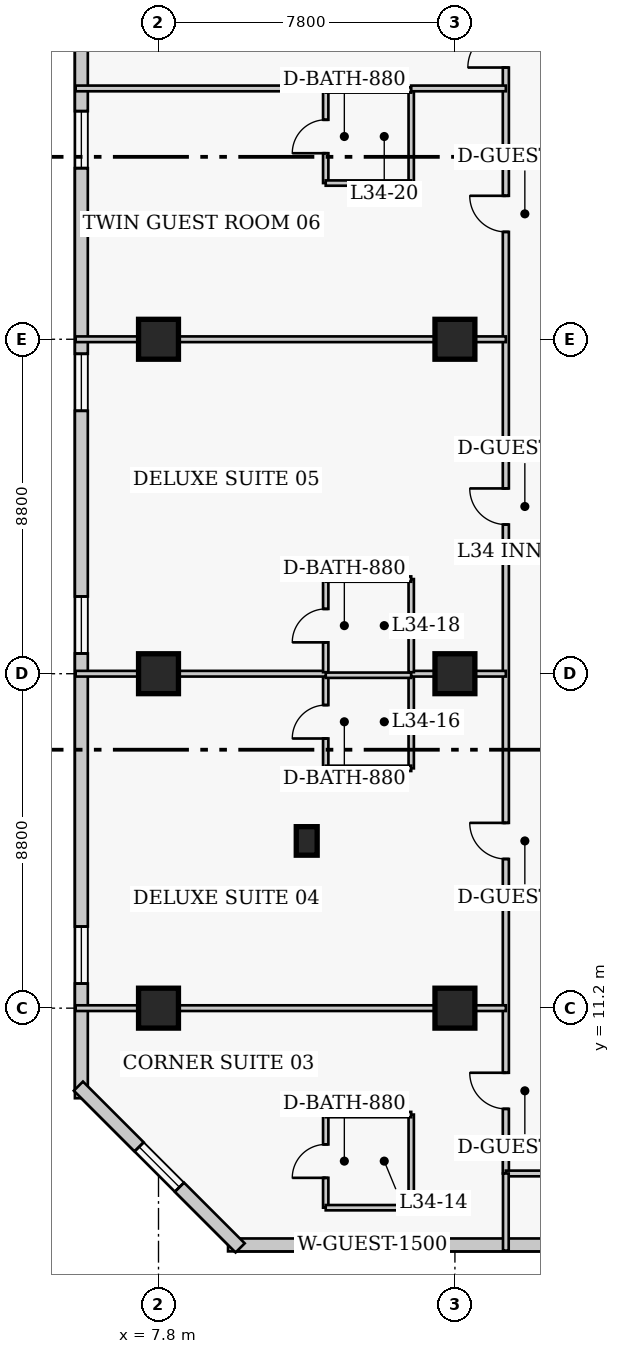
"""IFC4 building model, lengths in metres.
Left out: names, types, materials, properties, quantities, classifications, styles, units other than length and angle.
Written with IfcOpenShell. Run it as: python <this file> out.ifc"""

import sys

from ifc_helpers import new_model, si_unit, direction, frame, frame_2d, origin, origin_2d, place, context, subcontext, project, spatial, rectangle, extrude, element, fill, save


model = new_model("IFC4")
c1 = context("Model", 3, precision=1e-05, world=origin(), true_north=direction((0.0, 1.0)))
c2 = subcontext(c1, "Body", "Model", "MODEL_VIEW")
j1 = project(units=[si_unit("LENGTHUNIT", "METRE"), si_unit("PLANEANGLEUNIT", "RADIAN")], contexts=[c1])
p1 = place(None, origin())
s1 = spatial("IfcSite", under=j1, at=p1, CompositionType="ELEMENT")
p2 = place(p1, origin())
s2 = spatial("IfcBuilding", under=s1, at=p2, CompositionType="ELEMENT")
p3 = place(p2, frame((0.0, 0.0, 138.4)))
s3 = spatial("IfcBuildingStorey", under=s2, at=p3, CompositionType="ELEMENT", Elevation=138.4)
for number, where, z_axis, x_axis in (
    (1, (7.8, 11.2, 0.0), (0.0, 0.0, 1.0), (1.0, 0.0, 0.0)),
    (2, (7.8, 20.0, 0.0), (0.0, 0.0, 1.0), (1.0, 0.0, 0.0)),
    (3, (7.8, 28.8, 0.0), (0.0, 0.0, 1.0), (1.0, 0.0, 0.0)),
    (4, (15.6, 11.2, 0.0), (0.0, 0.0, 1.0), (1.0, 0.0, 0.0)),
    (5, (15.6, 20.0, 0.0), (0.0, 0.0, 1.0), (1.0, 0.0, 0.0)),
    (6, (15.6, 28.8, 0.0), (0.0, 0.0, 1.0), (1.0, 0.0, 0.0)),
):
    element("IfcColumn", number, at=place(p3, frame(where, z_axis=z_axis, x_axis=x_axis)), inside=s3, PredefinedType="COLUMN", context=c2, shape_type="SweptSolid", body=[
        extrude(rectangle(XDim=1.05, YDim=1.05, at=origin_2d()), origin(), (0.0, 0.0, 1.0), 3.8),
    ])
p4 = place(p3, frame((11.7, 15.6, 0.0), z_axis=(0.0, 0.0, 1.0), x_axis=(1.0, 0.0, 0.0)))
e7 = element("IfcColumn", 7, at=p4, inside=s3, PredefinedType="PILASTER", context=c2, shape_type="SweptSolid", body=[
    extrude(rectangle(XDim=0.55, YDim=0.75, at=origin_2d()), origin(), (0.0, 0.0, 1.0), 3.8),
])
p5 = place(p3, frame((9.63, 4.97, 0.0), z_axis=(0.0, 0.0, 1.0), x_axis=(1.0, 0.0, 0.0)))
e8 = element("IfcWall", 8, at=p5, inside=s3, PredefinedType="SOLIDWALL", context=c2, shape_type="SweptSolid", body=[
    extrude(rectangle(XDim=26.69, YDim=0.34, at=frame_2d((13.345, 0.0))), origin(), (0.0, 0.0, 1.0), 3.55),
])
p6 = place(p5, frame((16.97, 0.0, 0.0)))
e9 = element("IfcOpeningElement", 9, at=p6, cuts=e8, PredefinedType="OPENING", context=c2, shape_type="SweptSolid", body=[
    extrude(rectangle(XDim=1.4, YDim=2.15, at=frame_2d((0.7, 1.075))), frame((0.0, 0.18, 0.0), z_axis=(0.0, -1.0, 0.0), x_axis=(1.0, 0.0, 0.0)), (0.0, 0.0, 1.0), 0.36),
])
p7 = place(p5, frame((3.048, 0.0, 0.85)))
e10 = element("IfcOpeningElement", 10, at=p7, cuts=e8, PredefinedType="OPENING", context=c2, shape_type="SweptSolid", body=[
    extrude(rectangle(XDim=1.5, YDim=1.75, at=frame_2d((0.75, 0.875))), frame((0.0, 0.18, 0.0), z_axis=(0.0, -1.0, 0.0), x_axis=(1.0, 0.0, 0.0)), (0.0, 0.0, 1.0), 0.36),
])
p8 = place(p5, frame((22.642, 0.0, 0.85)))
e11 = element("IfcOpeningElement", 11, at=p8, cuts=e8, PredefinedType="OPENING", context=c2, shape_type="SweptSolid", body=[
    extrude(rectangle(XDim=1.5, YDim=1.75, at=frame_2d((0.75, 0.875))), frame((0.0, 0.18, 0.0), z_axis=(0.0, -1.0, 0.0), x_axis=(1.0, 0.0, 0.0)), (0.0, 0.0, 1.0), 0.36),
])
p9 = place(p3, frame((5.77, 38.97, 0.0), z_axis=(0.0, 0.0, 1.0), x_axis=(0.0, -1.0, 0.0)))
e12 = element("IfcWall", 12, at=p9, inside=s3, PredefinedType="SOLIDWALL", context=c2, shape_type="SweptSolid", body=[
    extrude(rectangle(XDim=30.14, YDim=0.34, at=frame_2d((15.07, 0.0))), origin(), (0.0, 0.0, 1.0), 3.55),
])
p10 = place(p9, frame((4.167, 0.0, 0.85)))
e13 = element("IfcOpeningElement", 13, at=p10, cuts=e12, PredefinedType="OPENING", context=c2, shape_type="SweptSolid", body=[
    extrude(rectangle(XDim=1.5, YDim=1.75, at=frame_2d((0.75, 0.875))), frame((0.0, 0.18, 0.0), z_axis=(0.0, -1.0, 0.0), x_axis=(1.0, 0.0, 0.0)), (0.0, 0.0, 1.0), 0.36),
])
p11 = place(p9, frame((10.552, 0.0, 0.85)))
e14 = element("IfcOpeningElement", 14, at=p11, cuts=e12, PredefinedType="OPENING", context=c2, shape_type="SweptSolid", body=[
    extrude(rectangle(XDim=1.5, YDim=1.75, at=frame_2d((0.75, 0.875))), frame((0.0, 0.18, 0.0), z_axis=(0.0, -1.0, 0.0), x_axis=(1.0, 0.0, 0.0)), (0.0, 0.0, 1.0), 0.36),
])
p12 = place(p9, frame((16.938, 0.0, 0.85)))
e15 = element("IfcOpeningElement", 15, at=p12, cuts=e12, PredefinedType="OPENING", context=c2, shape_type="SweptSolid", body=[
    extrude(rectangle(XDim=1.5, YDim=1.75, at=frame_2d((0.75, 0.875))), frame((0.0, 0.18, 0.0), z_axis=(0.0, -1.0, 0.0), x_axis=(1.0, 0.0, 0.0)), (0.0, 0.0, 1.0), 0.36),
])
p13 = place(p9, frame((25.623, 0.0, 0.85)))
e16 = element("IfcOpeningElement", 16, at=p13, cuts=e12, PredefinedType="OPENING", context=c2, shape_type="SweptSolid", body=[
    extrude(rectangle(XDim=1.5, YDim=1.75, at=frame_2d((0.75, 0.875))), frame((0.0, 0.18, 0.0), z_axis=(0.0, -1.0, 0.0), x_axis=(1.0, 0.0, 0.0)), (0.0, 0.0, 1.0), 0.36),
])
p14 = place(p3, frame((5.692, 9.148, 0.0), z_axis=(0.0, 0.0, 1.0), x_axis=(0.707106781187, -0.707106781187, 0.0)))
e17 = element("IfcWall", 17, at=p14, inside=s3, PredefinedType="SOLIDWALL", context=c2, shape_type="SweptSolid", body=[
    extrude(rectangle(XDim=6.02, YDim=0.34, at=frame_2d((3.01, 0.0))), origin(), (0.0, 0.0, 1.0), 3.55),
])
p15 = place(p14, frame((2.26, 0.0, 0.85)))
e18 = element("IfcOpeningElement", 18, at=p15, cuts=e17, PredefinedType="OPENING", context=c2, shape_type="SweptSolid", body=[
    extrude(rectangle(XDim=1.5, YDim=1.75, at=frame_2d((0.75, 0.875))), frame((0.0, 0.18, 0.0), z_axis=(0.0, -1.0, 0.0), x_axis=(1.0, 0.0, 0.0)), (0.0, 0.0, 1.0), 0.36),
])
p16 = place(p3, frame((16.94, 6.85, 0.0), z_axis=(0.0, 0.0, 1.0), x_axis=(0.0, 1.0, 0.0)))
e19 = element("IfcWall", 19, at=p16, inside=s3, PredefinedType="PARTITIONING", context=c2, shape_type="SweptSolid", body=[
    extrude(rectangle(XDim=33.8, YDim=0.16, at=frame_2d((16.9, 0.0))), origin(), (0.0, 0.0, 1.0), 3.55),
])
p17 = place(p16, frame((1.7, 0.0, 0.0)))
e20 = element("IfcOpeningElement", 20, at=p17, cuts=e19, PredefinedType="OPENING", context=c2, shape_type="SweptSolid", body=[
    extrude(rectangle(XDim=0.95, YDim=2.1, at=frame_2d((0.475, 1.05))), frame((0.0, 0.09, 0.0), z_axis=(0.0, -1.0, 0.0), x_axis=(1.0, 0.0, 0.0)), (0.0, 0.0, 1.0), 0.18),
])
p18 = place(p16, frame((8.275, 0.0, 0.0)))
e21 = element("IfcOpeningElement", 21, at=p18, cuts=e19, PredefinedType="OPENING", context=c2, shape_type="SweptSolid", body=[
    extrude(rectangle(XDim=0.95, YDim=2.1, at=frame_2d((0.475, 1.05))), frame((0.0, 0.09, 0.0), z_axis=(0.0, -1.0, 0.0), x_axis=(1.0, 0.0, 0.0)), (0.0, 0.0, 1.0), 0.18),
])
p19 = place(p16, frame((17.075, 0.0, 0.0)))
e22 = element("IfcOpeningElement", 22, at=p19, cuts=e19, PredefinedType="OPENING", context=c2, shape_type="SweptSolid", body=[
    extrude(rectangle(XDim=0.95, YDim=2.1, at=frame_2d((0.475, 1.05))), frame((0.0, 0.09, 0.0), z_axis=(0.0, -1.0, 0.0), x_axis=(1.0, 0.0, 0.0)), (0.0, 0.0, 1.0), 0.18),
])
p20 = place(p16, frame((24.775, 0.0, 0.0)))
e23 = element("IfcOpeningElement", 23, at=p20, cuts=e19, PredefinedType="OPENING", context=c2, shape_type="SweptSolid", body=[
    extrude(rectangle(XDim=0.95, YDim=2.1, at=frame_2d((0.475, 1.05))), frame((0.0, 0.09, 0.0), z_axis=(0.0, -1.0, 0.0), x_axis=(1.0, 0.0, 0.0)), (0.0, 0.0, 1.0), 0.18),
])
p21 = place(p16, frame((29.1, 0.0, 0.0)))
e24 = element("IfcOpeningElement", 24, at=p21, cuts=e19, PredefinedType="OPENING", context=c2, shape_type="SweptSolid", body=[
    extrude(rectangle(XDim=1.0, YDim=2.15, at=frame_2d((0.5, 1.075))), frame((0.0, 0.09, 0.0), z_axis=(0.0, -1.0, 0.0), x_axis=(1.0, 0.0, 0.0)), (0.0, 0.0, 1.0), 0.18),
])
p22 = place(p3, frame((16.94, 6.85, 0.0), z_axis=(0.0, 0.0, 1.0), x_axis=(1.0, 0.0, 0.0)))
e25 = element("IfcWall", 25, at=p22, inside=s3, PredefinedType="PARTITIONING", context=c2, shape_type="SweptSolid", body=[
    extrude(rectangle(XDim=2.22, YDim=0.15, at=frame_2d((1.11, 0.0))), origin(), (0.0, 0.0, 1.0), 3.55),
])
p23 = place(p3, frame((16.94, 4.82, 0.0), z_axis=(0.0, 0.0, 1.0), x_axis=(0.0, 1.0, 0.0)))
e26 = element("IfcWall", 26, at=p23, inside=s3, PredefinedType="PARTITIONING", context=c2, shape_type="SweptSolid", body=[
    extrude(rectangle(XDim=2.03, YDim=0.15, at=frame_2d((1.015, 0.0))), origin(), (0.0, 0.0, 1.0), 3.55),
])
p24 = place(p3, frame((12.2, 5.95, 0.0), z_axis=(0.0, 0.0, 1.0), x_axis=(0.0, 1.0, 0.0)))
e27 = element("IfcWall", 27, at=p24, inside=s3, PredefinedType="PLUMBINGWALL", context=c2, shape_type="SweptSolid", body=[
    extrude(rectangle(XDim=2.45, YDim=0.14, at=frame_2d((1.225, 0.0))), origin(), (0.0, 0.0, 1.0), 3.55),
])
p25 = place(p24, frame((0.785, 0.0, 0.0)))
e28 = element("IfcOpeningElement", 28, at=p25, cuts=e27, PredefinedType="OPENING", context=c2, shape_type="SweptSolid", body=[
    extrude(rectangle(XDim=0.88, YDim=2.05, at=frame_2d((0.44, 1.025))), frame((0.0, 0.08, 0.0), z_axis=(0.0, -1.0, 0.0), x_axis=(1.0, 0.0, 0.0)), (0.0, 0.0, 1.0), 0.16),
])
p26 = place(p3, frame((14.45, 5.95, 0.0), z_axis=(0.0, 0.0, 1.0), x_axis=(0.0, 1.0, 0.0)))
e29 = element("IfcWall", 29, at=p26, inside=s3, PredefinedType="PLUMBINGWALL", context=c2, shape_type="SweptSolid", body=[
    extrude(rectangle(XDim=2.45, YDim=0.14, at=frame_2d((1.225, 0.0))), origin(), (0.0, 0.0, 1.0), 3.55),
])
for number, where, z_axis, x_axis in (
    (30, (12.2, 5.95, 0.0), (0.0, 0.0, 1.0), (1.0, 0.0, 0.0)),
    (31, (12.2, 8.4, 0.0), (0.0, 0.0, 1.0), (1.0, 0.0, 0.0)),
):
    element("IfcWall", number, at=place(p3, frame(where, z_axis=z_axis, x_axis=x_axis)), inside=s3, PredefinedType="PLUMBINGWALL", context=c2, shape_type="SweptSolid", body=[
        extrude(rectangle(XDim=2.25, YDim=0.14, at=frame_2d((1.125, 0.0))), origin(), (0.0, 0.0, 1.0), 3.55),
    ])
p27 = place(p3, frame((5.62, 11.2, 0.0), z_axis=(0.0, 0.0, 1.0), x_axis=(1.0, 0.0, 0.0)))
e32 = element("IfcWall", 32, at=p27, inside=s3, PredefinedType="PARTITIONING", context=c2, shape_type="SweptSolid", body=[
    extrude(rectangle(XDim=11.32, YDim=0.15, at=frame_2d((5.66, 0.0))), origin(), (0.0, 0.0, 1.0), 2.778),
])
p28 = place(p3, frame((12.2, 17.51, 0.0), z_axis=(0.0, 0.0, 1.0), x_axis=(0.0, 1.0, 0.0)))
e33 = element("IfcWall", 33, at=p28, inside=s3, PredefinedType="PLUMBINGWALL", context=c2, shape_type="SweptSolid", body=[
    extrude(rectangle(XDim=2.45, YDim=0.14, at=frame_2d((1.225, 0.0))), origin(), (0.0, 0.0, 1.0), 3.55),
])
p29 = place(p28, frame((0.785, 0.0, 0.0)))
e34 = element("IfcOpeningElement", 34, at=p29, cuts=e33, PredefinedType="OPENING", context=c2, shape_type="SweptSolid", body=[
    extrude(rectangle(XDim=0.88, YDim=2.05, at=frame_2d((0.44, 1.025))), frame((0.0, 0.08, 0.0), z_axis=(0.0, -1.0, 0.0), x_axis=(1.0, 0.0, 0.0)), (0.0, 0.0, 1.0), 0.16),
])
p30 = place(p3, frame((14.45, 17.51, 0.0), z_axis=(0.0, 0.0, 1.0), x_axis=(0.0, 1.0, 0.0)))
e35 = element("IfcWall", 35, at=p30, inside=s3, PredefinedType="PLUMBINGWALL", context=c2, shape_type="SweptSolid", body=[
    extrude(rectangle(XDim=2.45, YDim=0.14, at=frame_2d((1.225, 0.0))), origin(), (0.0, 0.0, 1.0), 3.55),
])
p31 = place(p3, frame((12.2, 17.51, 0.0), z_axis=(0.0, 0.0, 1.0), x_axis=(1.0, 0.0, 0.0)))
e36 = element("IfcWall", 36, at=p31, inside=s3, PredefinedType="PLUMBINGWALL", context=c2, shape_type="SweptSolid", body=[
    extrude(rectangle(XDim=2.25, YDim=0.14, at=frame_2d((1.125, 0.0))), origin(), (0.0, 0.0, 1.0), 3.55),
])
p32 = place(p3, frame((12.2, 19.96, 0.0), z_axis=(0.0, 0.0, 1.0), x_axis=(1.0, 0.0, 0.0)))
e37 = element("IfcWall", 37, at=p32, inside=s3, PredefinedType="PLUMBINGWALL", context=c2, shape_type="SweptSolid", body=[
    extrude(rectangle(XDim=2.25, YDim=0.14, at=frame_2d((1.125, 0.0))), origin(), (0.0, 0.0, 1.0), 2.9),
])
p33 = place(p3, frame((5.62, 20.0, 0.0), z_axis=(0.0, 0.0, 1.0), x_axis=(1.0, 0.0, 0.0)))
e38 = element("IfcWall", 38, at=p33, inside=s3, PredefinedType="PARTITIONING", context=c2, shape_type="SweptSolid", body=[
    extrude(rectangle(XDim=6.58, YDim=0.15, at=frame_2d((3.29, 0.0))), origin(), (0.0, 0.0, 1.0), 2.778),
])
p34 = place(p3, frame((14.45, 20.0, 0.0), z_axis=(0.0, 0.0, 1.0), x_axis=(1.0, 0.0, 0.0)))
e39 = element("IfcWall", 39, at=p34, inside=s3, PredefinedType="PARTITIONING", context=c2, shape_type="SweptSolid", body=[
    extrude(rectangle(XDim=2.49, YDim=0.15, at=frame_2d((1.245, 0.0))), origin(), (0.0, 0.0, 1.0), 2.778),
])
p35 = place(p3, frame((12.2, 20.04, 0.0), z_axis=(0.0, 0.0, 1.0), x_axis=(0.0, 1.0, 0.0)))
e40 = element("IfcWall", 40, at=p35, inside=s3, PredefinedType="PLUMBINGWALL", context=c2, shape_type="SweptSolid", body=[
    extrude(rectangle(XDim=2.45, YDim=0.14, at=frame_2d((1.225, 0.0))), origin(), (0.0, 0.0, 1.0), 3.55),
])
p36 = place(p35, frame((0.785, 0.0, 0.0)))
e41 = element("IfcOpeningElement", 41, at=p36, cuts=e40, PredefinedType="OPENING", context=c2, shape_type="SweptSolid", body=[
    extrude(rectangle(XDim=0.88, YDim=2.05, at=frame_2d((0.44, 1.025))), frame((0.0, 0.08, 0.0), z_axis=(0.0, -1.0, 0.0), x_axis=(1.0, 0.0, 0.0)), (0.0, 0.0, 1.0), 0.16),
])
p37 = place(p3, frame((14.45, 20.04, 0.0), z_axis=(0.0, 0.0, 1.0), x_axis=(0.0, 1.0, 0.0)))
e42 = element("IfcWall", 42, at=p37, inside=s3, PredefinedType="PLUMBINGWALL", context=c2, shape_type="SweptSolid", body=[
    extrude(rectangle(XDim=2.45, YDim=0.14, at=frame_2d((1.225, 0.0))), origin(), (0.0, 0.0, 1.0), 3.55),
])
p38 = place(p3, frame((12.2, 22.49, 0.0), z_axis=(0.0, 0.0, 1.0), x_axis=(1.0, 0.0, 0.0)))
e43 = element("IfcWall", 43, at=p38, inside=s3, PredefinedType="PLUMBINGWALL", context=c2, shape_type="SweptSolid", body=[
    extrude(rectangle(XDim=2.25, YDim=0.14, at=frame_2d((1.125, 0.0))), origin(), (0.0, 0.0, 1.0), 3.55),
])
p39 = place(p3, frame((5.62, 28.8, 0.0), z_axis=(0.0, 0.0, 1.0), x_axis=(1.0, 0.0, 0.0)))
e44 = element("IfcWall", 44, at=p39, inside=s3, PredefinedType="PARTITIONING", context=c2, shape_type="SweptSolid", body=[
    extrude(rectangle(XDim=11.32, YDim=0.15, at=frame_2d((5.66, 0.0))), origin(), (0.0, 0.0, 1.0), 2.778),
])
p40 = place(p3, frame((12.2, 32.91, 0.0), z_axis=(0.0, 0.0, 1.0), x_axis=(0.0, 1.0, 0.0)))
e45 = element("IfcWall", 45, at=p40, inside=s3, PredefinedType="PLUMBINGWALL", context=c2, shape_type="SweptSolid", body=[
    extrude(rectangle(XDim=2.45, YDim=0.14, at=frame_2d((1.225, 0.0))), origin(), (0.0, 0.0, 1.0), 3.55),
])
p41 = place(p40, frame((0.785, 0.0, 0.0)))
e46 = element("IfcOpeningElement", 46, at=p41, cuts=e45, PredefinedType="OPENING", context=c2, shape_type="SweptSolid", body=[
    extrude(rectangle(XDim=0.88, YDim=2.05, at=frame_2d((0.44, 1.025))), frame((0.0, 0.08, 0.0), z_axis=(0.0, -1.0, 0.0), x_axis=(1.0, 0.0, 0.0)), (0.0, 0.0, 1.0), 0.16),
])
p42 = place(p3, frame((14.45, 32.91, 0.0), z_axis=(0.0, 0.0, 1.0), x_axis=(0.0, 1.0, 0.0)))
e47 = element("IfcWall", 47, at=p42, inside=s3, PredefinedType="PLUMBINGWALL", context=c2, shape_type="SweptSolid", body=[
    extrude(rectangle(XDim=2.45, YDim=0.14, at=frame_2d((1.225, 0.0))), origin(), (0.0, 0.0, 1.0), 3.55),
])
for number, where, z_axis, x_axis in (
    (48, (12.2, 32.91, 0.0), (0.0, 0.0, 1.0), (1.0, 0.0, 0.0)),
    (49, (12.2, 35.36, 0.0), (0.0, 0.0, 1.0), (1.0, 0.0, 0.0)),
):
    element("IfcWall", number, at=place(p3, frame(where, z_axis=z_axis, x_axis=x_axis)), inside=s3, PredefinedType="PLUMBINGWALL", context=c2, shape_type="SweptSolid", body=[
        extrude(rectangle(XDim=2.25, YDim=0.14, at=frame_2d((1.125, 0.0))), origin(), (0.0, 0.0, 1.0), 3.55),
    ])
p43 = place(p3, frame((5.62, 35.4, 0.0), z_axis=(0.0, 0.0, 1.0), x_axis=(1.0, 0.0, 0.0)))
e50 = element("IfcWall", 50, at=p43, inside=s3, PredefinedType="PARTITIONING", context=c2, shape_type="SweptSolid", body=[
    extrude(rectangle(XDim=6.58, YDim=0.15, at=frame_2d((3.29, 0.0))), origin(), (0.0, 0.0, 1.0), 3.55),
])
p44 = place(p3, frame((14.45, 35.4, 0.0), z_axis=(0.0, 0.0, 1.0), x_axis=(1.0, 0.0, 0.0)))
e51 = element("IfcWall", 51, at=p44, inside=s3, PredefinedType="PARTITIONING", context=c2, shape_type="SweptSolid", body=[
    extrude(rectangle(XDim=2.49, YDim=0.15, at=frame_2d((1.245, 0.0))), origin(), (0.0, 0.0, 1.0), 3.55),
])
p45 = place(p7, origin())
e52 = element("IfcWindow", 52, at=p45, inside=s3, PartitioningType="SINGLE_PANEL", PredefinedType="WINDOW", context=c2, shape_type="SweptSolid", body=[
    extrude(rectangle(XDim=1.5, YDim=1.75, at=frame_2d((0.75, 0.875))), frame((0.0, 0.03, 0.0), z_axis=(0.0, -1.0, 0.0), x_axis=(1.0, 0.0, 0.0)), (0.0, 0.0, 1.0), 0.06),
])
fill(e10, e52)
p46 = place(p10, origin())
e53 = element("IfcWindow", 53, at=p46, inside=s3, PartitioningType="SINGLE_PANEL", PredefinedType="WINDOW", context=c2, shape_type="SweptSolid", body=[
    extrude(rectangle(XDim=1.5, YDim=1.75, at=frame_2d((0.75, 0.875))), frame((0.0, 0.03, 0.0), z_axis=(0.0, -1.0, 0.0), x_axis=(1.0, 0.0, 0.0)), (0.0, 0.0, 1.0), 0.06),
])
fill(e13, e53)
p47 = place(p11, origin())
e54 = element("IfcWindow", 54, at=p47, inside=s3, PartitioningType="SINGLE_PANEL", PredefinedType="WINDOW", context=c2, shape_type="SweptSolid", body=[
    extrude(rectangle(XDim=1.5, YDim=1.75, at=frame_2d((0.75, 0.875))), frame((0.0, 0.03, 0.0), z_axis=(0.0, -1.0, 0.0), x_axis=(1.0, 0.0, 0.0)), (0.0, 0.0, 1.0), 0.06),
])
fill(e14, e54)
p48 = place(p12, origin())
e55 = element("IfcWindow", 55, at=p48, inside=s3, PartitioningType="SINGLE_PANEL", PredefinedType="WINDOW", context=c2, shape_type="SweptSolid", body=[
    extrude(rectangle(XDim=1.5, YDim=1.75, at=frame_2d((0.75, 0.875))), frame((0.0, 0.03, 0.0), z_axis=(0.0, -1.0, 0.0), x_axis=(1.0, 0.0, 0.0)), (0.0, 0.0, 1.0), 0.06),
])
fill(e15, e55)
p49 = place(p13, origin())
e56 = element("IfcWindow", 56, at=p49, inside=s3, PartitioningType="SINGLE_PANEL", PredefinedType="WINDOW", context=c2, shape_type="SweptSolid", body=[
    extrude(rectangle(XDim=1.5, YDim=1.75, at=frame_2d((0.75, 0.875))), frame((0.0, 0.03, 0.0), z_axis=(0.0, -1.0, 0.0), x_axis=(1.0, 0.0, 0.0)), (0.0, 0.0, 1.0), 0.06),
])
fill(e16, e56)
p50 = place(p15, origin())
e57 = element("IfcWindow", 57, at=p50, inside=s3, PartitioningType="SINGLE_PANEL", PredefinedType="WINDOW", context=c2, shape_type="SweptSolid", body=[
    extrude(rectangle(XDim=1.5, YDim=1.75, at=frame_2d((0.75, 0.875))), frame((0.0, 0.03, 0.0), z_axis=(0.0, -1.0, 0.0), x_axis=(1.0, 0.0, 0.0)), (0.0, 0.0, 1.0), 0.06),
])
fill(e18, e57)
p51 = place(p25, origin())
e58 = element("IfcDoor", 58, at=p51, inside=s3, OperationType="SINGLE_SWING_LEFT", PredefinedType="DOOR", context=c2, shape_type="SweptSolid", body=[
    extrude(rectangle(XDim=0.88, YDim=2.05, at=frame_2d((0.44, 1.025))), frame((0.0, 0.025, 0.0), z_axis=(0.0, -1.0, 0.0), x_axis=(1.0, 0.0, 0.0)), (0.0, 0.0, 1.0), 0.05),
])
fill(e28, e58)
p52 = place(p17, origin())
e59 = element("IfcDoor", 59, at=p52, inside=s3, OperationType="SINGLE_SWING_RIGHT", PredefinedType="DOOR", context=c2, shape_type="SweptSolid", body=[
    extrude(rectangle(XDim=0.95, YDim=2.1, at=frame_2d((0.475, 1.05))), frame((0.0, 0.025, 0.0), z_axis=(0.0, -1.0, 0.0), x_axis=(1.0, 0.0, 0.0)), (0.0, 0.0, 1.0), 0.05),
])
fill(e20, e59)
p53 = place(p29, origin())
e60 = element("IfcDoor", 60, at=p53, inside=s3, OperationType="SINGLE_SWING_LEFT", PredefinedType="DOOR", context=c2, shape_type="SweptSolid", body=[
    extrude(rectangle(XDim=0.88, YDim=2.05, at=frame_2d((0.44, 1.025))), frame((0.0, 0.025, 0.0), z_axis=(0.0, -1.0, 0.0), x_axis=(1.0, 0.0, 0.0)), (0.0, 0.0, 1.0), 0.05),
])
fill(e34, e60)
p54 = place(p18, origin())
e61 = element("IfcDoor", 61, at=p54, inside=s3, OperationType="SINGLE_SWING_RIGHT", PredefinedType="DOOR", context=c2, shape_type="SweptSolid", body=[
    extrude(rectangle(XDim=0.95, YDim=2.1, at=frame_2d((0.475, 1.05))), frame((0.0, 0.025, 0.0), z_axis=(0.0, -1.0, 0.0), x_axis=(1.0, 0.0, 0.0)), (0.0, 0.0, 1.0), 0.05),
])
fill(e21, e61)
p55 = place(p36, origin())
e62 = element("IfcDoor", 62, at=p55, inside=s3, OperationType="SINGLE_SWING_LEFT", PredefinedType="DOOR", context=c2, shape_type="SweptSolid", body=[
    extrude(rectangle(XDim=0.88, YDim=2.05, at=frame_2d((0.44, 1.025))), frame((0.0, 0.025, 0.0), z_axis=(0.0, -1.0, 0.0), x_axis=(1.0, 0.0, 0.0)), (0.0, 0.0, 1.0), 0.05),
])
fill(e41, e62)
p56 = place(p19, origin())
e63 = element("IfcDoor", 63, at=p56, inside=s3, OperationType="SINGLE_SWING_RIGHT", PredefinedType="DOOR", context=c2, shape_type="SweptSolid", body=[
    extrude(rectangle(XDim=0.95, YDim=2.1, at=frame_2d((0.475, 1.05))), frame((0.0, 0.025, 0.0), z_axis=(0.0, -1.0, 0.0), x_axis=(1.0, 0.0, 0.0)), (0.0, 0.0, 1.0), 0.05),
])
fill(e22, e63)
p57 = place(p41, origin())
e64 = element("IfcDoor", 64, at=p57, inside=s3, OperationType="SINGLE_SWING_LEFT", PredefinedType="DOOR", context=c2, shape_type="SweptSolid", body=[
    extrude(rectangle(XDim=0.88, YDim=2.05, at=frame_2d((0.44, 1.025))), frame((0.0, 0.025, 0.0), z_axis=(0.0, -1.0, 0.0), x_axis=(1.0, 0.0, 0.0)), (0.0, 0.0, 1.0), 0.05),
])
fill(e46, e64)
p58 = place(p20, origin())
e65 = element("IfcDoor", 65, at=p58, inside=s3, OperationType="SINGLE_SWING_RIGHT", PredefinedType="DOOR", context=c2, shape_type="SweptSolid", body=[
    extrude(rectangle(XDim=0.95, YDim=2.1, at=frame_2d((0.475, 1.05))), frame((0.0, 0.025, 0.0), z_axis=(0.0, -1.0, 0.0), x_axis=(1.0, 0.0, 0.0)), (0.0, 0.0, 1.0), 0.05),
])
fill(e23, e65)
p59 = place(p21, origin())
e66 = element("IfcDoor", 66, at=p59, inside=s3, OperationType="SINGLE_SWING_LEFT", PredefinedType="DOOR", context=c2, shape_type="SweptSolid", body=[
    extrude(rectangle(XDim=1.0, YDim=2.15, at=frame_2d((0.5, 1.075))), frame((0.0, 0.025, 0.0), z_axis=(0.0, -1.0, 0.0), x_axis=(1.0, 0.0, 0.0)), (0.0, 0.0, 1.0), 0.05),
])
fill(e24, e66)
save(model, sys.argv[1])
